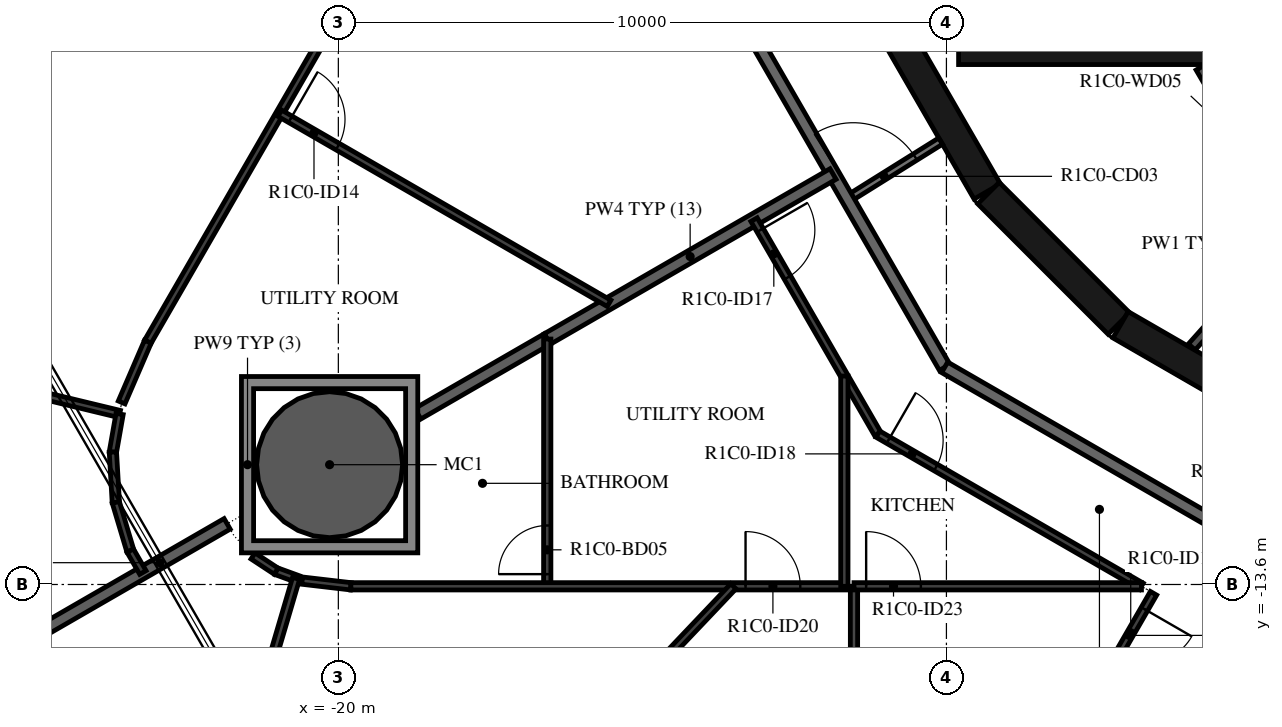
"""IFC4 building model, lengths in metres.
Left out: names, types, materials, properties, quantities, classifications, styles, units other than length and angle.
Written with IfcOpenShell. Run it as: python <this file> out.ifc"""

import sys

from ifc_helpers import new_model, si_unit, direction, frame, frame_2d, origin, origin_2d, place, context, subcontext, project, spatial, polyline, rectangle, hollow_circle, outline, extrude, element, fill, save


model = new_model("IFC4")
c1 = context("Model", 3, precision=1e-05, world=origin(), true_north=direction((0.0, 1.0)))
c2 = subcontext(c1, "Body", "Model", "MODEL_VIEW")
j1 = project(units=[si_unit("LENGTHUNIT", "METRE"), si_unit("PLANEANGLEUNIT", "RADIAN")], contexts=[c1])
p1 = place(None, origin())
s1 = spatial("IfcSite", under=j1, at=p1, CompositionType="ELEMENT")
p2 = place(p1, origin())
s2 = spatial("IfcBuilding", under=s1, at=p2, CompositionType="ELEMENT")
p3 = place(p2, frame((0.0, 0.0, 59.4)))
s3 = spatial("IfcBuildingStorey", under=s2, at=p3, CompositionType="ELEMENT", Elevation=59.4)
p4 = place(p3, frame((-20.144, -11.63, -0.38), z_axis=(0.0, 0.0, 1.0), x_axis=(1.0, 0.0, 0.0)))
e1 = element("IfcColumn", 1, at=p4, inside=s3, PredefinedType="COLUMN", context=c2, shape_type="SweptSolid", body=[
    extrude(hollow_circle(Radius=1.2, WallThickness=0.06, at=origin_2d()), origin(), (0.0, 0.0, 1.0), 3.5),
])
p5 = place(p3, frame((-10.845, -4.51, 0.0), z_axis=(0.0, 0.0, 1.0), x_axis=(0.500087131594, -0.865975092491, 0.0)))
e2 = element("IfcWall", 2, at=p5, inside=s3, PredefinedType="SHEAR", context=c2, shape_type="SweptSolid", body=[
    extrude(rectangle(XDim=3.033, YDim=0.5, at=frame_2d((1.516, 0.0))), origin(), (0.0, 0.0, 1.0), 3.12),
])
p6 = place(p3, frame((-9.308, -7.164, 0.0), z_axis=(0.0, 0.0, 1.0), x_axis=(0.707106781187, -0.707106781187, 0.0)))
e3 = element("IfcWall", 3, at=p6, inside=s3, PredefinedType="SHEAR", context=c2, shape_type="SweptSolid", body=[
    extrude(rectangle(XDim=3.032, YDim=0.5, at=frame_2d((1.516, 0.0))), origin(), (0.0, 0.0, 1.0), 3.12),
])
p7 = place(p3, frame((-7.137, -9.329, 0.0), z_axis=(0.0, 0.0, 1.0), x_axis=(0.865975092491, -0.500087131594, 0.0)))
e4 = element("IfcWall", 4, at=p7, inside=s3, PredefinedType="SHEAR", context=c2, shape_type="SweptSolid", body=[
    extrude(rectangle(XDim=3.033, YDim=0.5, at=frame_2d((1.516, 0.0))), origin(), (0.0, 0.0, 1.0), 3.12),
])
p8 = place(p3, origin())
e5 = element("IfcWall", 5, at=p8, inside=s3, PredefinedType="SHEAR", context=c2, shape_type="SweptSolid", body=[
    extrude(outline(polyline([(9.8, -5.05), (9.8, -4.8), (9.8, -1.9), (9.55, -1.9), (9.55, -4.8), (7.65, -4.8), (7.65, -1.9), (7.4, -1.9), (7.4, -4.8), (5.5, -4.8), (5.5, -1.9), (5.25, -1.9), (5.25, -4.8), (3.35, -4.8), (3.35, -1.9), (3.1, -1.9), (3.1, -4.8), (-5.25, -4.8), (-5.25, -1.9), (-5.5, -1.9), (-5.5, -4.8), (-7.4, -4.8), (-7.4, -1.9), (-7.65, -1.9), (-7.65, -4.8), (-9.55, -4.8), (-9.55, -1.9), (-9.8, -1.9), (-9.8, -4.8), (-9.8, -5.05), (9.8, -5.05)])), origin(), (0.0, 0.0, 1.0), 3.12),
])
p9 = place(p3, frame((-5.829, -5.102, 0.0), z_axis=(0.0, 0.0, 1.0), x_axis=(0.504480008384, -0.863423373057, 0.0)))
e6 = element("IfcWall", 6, at=p9, inside=s3, PredefinedType="PARTITIONING", context=c2, shape_type="SweptSolid", body=[
    extrude(rectangle(XDim=3.115, YDim=0.15, at=frame_2d((1.558, 0.0))), origin(), (0.0, 0.0, 1.0), 3.12),
])
p10 = place(p9, frame((1.107, 0.0, 0.0)))
e7 = element("IfcOpeningElement", 7, at=p10, cuts=e6, PredefinedType="OPENING", context=c2, shape_type="SweptSolid", body=[
    extrude(rectangle(XDim=0.9, YDim=2.1, at=frame_2d((0.45, 1.05))), frame((0.0, 0.085, 0.0), z_axis=(0.0, -1.0, 0.0), x_axis=(1.0, 0.0, 0.0)), (0.0, 0.0, 1.0), 0.17),
])
p11 = place(p3, frame((-4.311, -7.851, 0.0), z_axis=(0.0, 0.0, 1.0), x_axis=(-0.667869133096, -0.744278725383, 0.0)))
e8 = element("IfcWall", 8, at=p11, inside=s3, PredefinedType="PARTITIONING", context=c2, shape_type="SweptSolid", body=[
    extrude(rectangle(XDim=2.476, YDim=0.15, at=frame_2d((1.238, 0.0))), origin(), (0.0, 0.0, 1.0), 3.12),
])
p12 = place(p11, frame((0.788, 0.0, 0.0)))
e9 = element("IfcOpeningElement", 9, at=p12, cuts=e8, PredefinedType="OPENING", context=c2, shape_type="SweptSolid", body=[
    extrude(rectangle(XDim=0.9, YDim=2.1, at=frame_2d((0.45, 1.05))), frame((0.0, 0.085, 0.0), z_axis=(0.0, -1.0, 0.0), x_axis=(1.0, 0.0, 0.0)), (0.0, 0.0, 1.0), 0.17),
])
p13 = place(p3, frame((-11.625, -7.264, 0.0), z_axis=(0.0, 0.0, 1.0), x_axis=(0.84803632456, 0.529938102259, 0.0)))
e10 = element("IfcWall", 10, at=p13, inside=s3, PredefinedType="PARTITIONING", context=c2, shape_type="SweptSolid", body=[
    extrude(rectangle(XDim=1.804, YDim=0.12, at=frame_2d((0.902, 0.0))), origin(), (0.0, 0.0, 1.0), 3.12),
])
p14 = place(p13, frame((0.11, 0.0, 0.0)))
e11 = element("IfcOpeningElement", 11, at=p14, cuts=e10, PredefinedType="OPENING", context=c2, shape_type="SweptSolid", body=[
    extrude(rectangle(XDim=1.2, YDim=2.1, at=frame_2d((0.6, 1.05))), frame((0.0, 0.07, 0.0), z_axis=(0.0, -1.0, 0.0), x_axis=(1.0, 0.0, 0.0)), (0.0, 0.0, 1.0), 0.14),
])
p15 = place(p3, frame((-13.7, -3.671, 0.0), z_axis=(0.0, 0.0, 1.0), x_axis=(0.500001669485, -0.866024439905, 0.0)))
e12 = element("IfcWall", 12, at=p15, inside=s3, PredefinedType="STANDARD", context=c2, shape_type="SweptSolid", body=[
    extrude(rectangle(XDim=7.342, YDim=0.2, at=frame_2d((3.671, 0.0))), origin(), (0.0, 0.0, 1.0), 3.12),
])
p16 = place(p3, frame((-10.029, -10.029, 0.0), z_axis=(0.0, 0.0, 1.0), x_axis=(0.866022878987, -0.500004373052, 0.0)))
e13 = element("IfcWall", 13, at=p16, inside=s3, PredefinedType="STANDARD", context=c2, shape_type="SweptSolid", body=[
    extrude(rectangle(XDim=7.146, YDim=0.2, at=frame_2d((3.573, 0.0))), origin(), (0.0, 0.0, 1.0), 3.12),
])
p17 = place(p16, frame((5.947, 0.0, 0.0)))
e14 = element("IfcOpeningElement", 14, at=p17, cuts=e13, PredefinedType="OPENING", context=c2, shape_type="SweptSolid", body=[
    extrude(rectangle(XDim=1.0, YDim=2.1, at=frame_2d((0.5, 1.05))), frame((0.0, 0.11, 0.0), z_axis=(0.0, -1.0, 0.0), x_axis=(1.0, 0.0, 0.0)), (0.0, 0.0, 1.0), 0.22),
])
p18 = place(p3, frame((-16.565, -9.564, 0.0), z_axis=(0.0, 0.0, 1.0), x_axis=(0.866028274568, 0.499995027624, 0.0)))
e15 = element("IfcWall", 15, at=p18, inside=s3, PredefinedType="STANDARD", context=c2, shape_type="SweptSolid", body=[
    extrude(rectangle(XDim=5.427, YDim=0.2, at=frame_2d((2.714, 0.0))), origin(), (0.0, 0.0, 1.0), 3.12),
])
p19 = place(p3, frame((-27.025, -15.603, 0.0), z_axis=(0.0, 0.0, 1.0), x_axis=(0.866020924479, 0.500007758305, 0.0)))
e16 = element("IfcWall", 16, at=p19, inside=s3, PredefinedType="STANDARD", context=c2, shape_type="SweptSolid", body=[
    extrude(rectangle(XDim=6.0, YDim=0.2, at=frame_2d((3.0, 0.0))), origin(), (0.0, 0.0, 1.0), 3.12),
])
p20 = place(p3, frame((-18.694, -10.793, 0.0), z_axis=(0.0, 0.0, 1.0), x_axis=(0.866046662726, 0.499963176624, 0.0)))
e17 = element("IfcWall", 17, at=p20, inside=s3, PredefinedType="STANDARD", context=c2, shape_type="SweptSolid", body=[
    extrude(rectangle(XDim=2.458, YDim=0.2, at=frame_2d((1.229, 0.0))), origin(), (0.0, 0.0, 1.0), 3.12),
])
p21 = place(p3, frame((-17.13, 0.79, 0.0), z_axis=(0.0, 0.0, 1.0), x_axis=(-0.499997052475, -0.866027105532, 0.0)))
e18 = element("IfcWall", 18, at=p21, inside=s3, PredefinedType="PARTITIONING", context=c2, shape_type="SweptSolid", body=[
    extrude(rectangle(XDim=12.006, YDim=0.12, at=frame_2d((6.003, 0.0))), origin(), (0.0, 0.0, 1.0), 3.12),
])
p22 = place(p21, frame((1.498, 0.0, 0.0)))
e19 = element("IfcOpeningElement", 19, at=p22, cuts=e18, PredefinedType="OPENING", context=c2, shape_type="SweptSolid", body=[
    extrude(rectangle(XDim=0.9, YDim=2.1, at=frame_2d((0.45, 1.05))), frame((0.0, 0.07, 0.0), z_axis=(0.0, -1.0, 0.0), x_axis=(1.0, 0.0, 0.0)), (0.0, 0.0, 1.0), 0.14),
])
p23 = place(p3, frame((-20.963, -5.85, 0.0), z_axis=(0.0, 0.0, 1.0), x_axis=(0.866021746608, -0.500006334362, 0.0)))
e20 = element("IfcWall", 20, at=p23, inside=s3, PredefinedType="PARTITIONING", context=c2, shape_type="SweptSolid", body=[
    extrude(rectangle(XDim=6.253, YDim=0.12, at=frame_2d((3.127, 0.0))), origin(), (0.0, 0.0, 1.0), 3.12),
])
p24 = place(p23, frame((0.2, 0.0, 0.0)))
e21 = element("IfcOpeningElement", 21, at=p24, cuts=e20, PredefinedType="OPENING", context=c2, shape_type="SweptSolid", body=[
    extrude(rectangle(XDim=0.9, YDim=2.1, at=frame_2d((0.45, 1.05))), frame((0.0, 0.07, 0.0), z_axis=(0.0, -1.0, 0.0), x_axis=(1.0, 0.0, 0.0)), (0.0, 0.0, 1.0), 0.14),
])
p25 = place(p3, frame((-23.564, -10.606, 0.0), z_axis=(0.0, 0.0, 1.0), x_axis=(0.396195073027, 0.918166359713, 0.0)))
e22 = element("IfcWall", 22, at=p25, inside=s3, PredefinedType="PARTITIONING", context=c2, shape_type="SweptSolid", body=[
    extrude(rectangle(XDim=1.087, YDim=0.12, at=frame_2d((0.543, 0.0))), origin(), (0.0, 0.0, 1.0), 3.12),
])
p26 = place(p3, frame((-27.883, -9.762, 0.0), z_axis=(0.0, 0.0, 1.0), x_axis=(0.972097015458, -0.234579181809, 0.0)))
e23 = element("IfcWall", 23, at=p26, inside=s3, PredefinedType="PARTITIONING", context=c2, shape_type="SweptSolid", body=[
    extrude(rectangle(XDim=4.409, YDim=0.12, at=frame_2d((2.204, 0.0))), origin(), (0.0, 0.0, 1.0), 3.12),
])
p27 = place(p26, frame((0.2, 0.0, 0.0)))
e24 = element("IfcOpeningElement", 24, at=p27, cuts=e23, PredefinedType="OPENING", context=c2, shape_type="SweptSolid", body=[
    extrude(rectangle(XDim=0.9, YDim=2.1, at=frame_2d((0.45, 1.05))), frame((0.0, 0.07, 0.0), z_axis=(0.0, -1.0, 0.0), x_axis=(1.0, 0.0, 0.0)), (0.0, 0.0, 1.0), 0.14),
])
p28 = place(p3, frame((-23.597, -10.796, 0.0), z_axis=(0.0, 0.0, 1.0), x_axis=(-0.173610040386, -0.984814476882, 0.0)))
e25 = element("IfcWall", 25, at=p28, inside=s3, PredefinedType="PARTITIONING", context=c2, shape_type="SweptSolid", body=[
    extrude(rectangle(XDim=0.636, YDim=0.12, at=frame_2d((0.318, 0.0))), origin(), (0.0, 0.0, 1.0), 3.12),
])
p29 = place(p3, frame((-23.708, -11.422, 0.0), z_axis=(0.0, 0.0, 1.0), x_axis=(0.058031280246, -0.998314765248, 0.0)))
e26 = element("IfcWall", 26, at=p29, inside=s3, PredefinedType="PARTITIONING", context=c2, shape_type="SweptSolid", body=[
    extrude(rectangle(XDim=0.829, YDim=0.12, at=frame_2d((0.415, 0.0))), origin(), (0.0, 0.0, 1.0), 3.12),
])
p30 = place(p3, frame((-23.659, -12.25, 0.0), z_axis=(0.0, 0.0, 1.0), x_axis=(0.286834510868, -0.957980147694, 0.0)))
e27 = element("IfcWall", 27, at=p30, inside=s3, PredefinedType="PARTITIONING", context=c2, shape_type="SweptSolid", body=[
    extrude(rectangle(XDim=0.829, YDim=0.12, at=frame_2d((0.415, 0.0))), origin(), (0.0, 0.0, 1.0), 3.12),
])
p31 = place(p3, frame((-23.422, -13.044, 0.0), z_axis=(0.0, 0.0, 1.0), x_axis=(0.50013037474, -0.865950118807, 0.0)))
e28 = element("IfcWall", 28, at=p31, inside=s3, PredefinedType="PARTITIONING", context=c2, shape_type="SweptSolid", body=[
    extrude(rectangle(XDim=0.415, YDim=0.12, at=frame_2d((0.207, 0.0))), origin(), (0.0, 0.0, 1.0), 3.12),
])
p32 = place(p3, frame((-13.164, -7.6, 0.0), z_axis=(0.0, 0.0, 1.0), x_axis=(0.500000928893, -0.866024867487, 0.0)))
e29 = element("IfcWall", 29, at=p32, inside=s3, PredefinedType="PARTITIONING", context=c2, shape_type="SweptSolid", body=[
    extrude(rectangle(XDim=4.073, YDim=0.12, at=frame_2d((2.036, 0.0))), origin(), (0.0, 0.0, 1.0), 3.12),
])
p33 = place(p32, frame((0.2, 0.0, 0.0)))
e30 = element("IfcOpeningElement", 30, at=p33, cuts=e29, PredefinedType="OPENING", context=c2, shape_type="SweptSolid", body=[
    extrude(rectangle(XDim=0.9, YDim=2.1, at=frame_2d((0.45, 1.05))), frame((0.0, 0.07, 0.0), z_axis=(0.0, -1.0, 0.0), x_axis=(1.0, 0.0, 0.0)), (0.0, 0.0, 1.0), 0.14),
])
p34 = place(p3, frame((-11.127, -11.127, 0.0), z_axis=(0.0, 0.0, 1.0), x_axis=(0.866034514313, -0.499984219769, 0.0)))
e31 = element("IfcWall", 31, at=p34, inside=s3, PredefinedType="PARTITIONING", context=c2, shape_type="SweptSolid", body=[
    extrude(rectangle(XDim=5.006, YDim=0.12, at=frame_2d((2.503, 0.0))), origin(), (0.0, 0.0, 1.0), 3.12),
])
p35 = place(p34, frame((0.2, 0.0, 0.0)))
e32 = element("IfcOpeningElement", 32, at=p35, cuts=e31, PredefinedType="OPENING", context=c2, shape_type="SweptSolid", body=[
    extrude(rectangle(XDim=0.9, YDim=2.1, at=frame_2d((0.45, 1.05))), frame((0.0, 0.07, 0.0), z_axis=(0.0, -1.0, 0.0), x_axis=(1.0, 0.0, 0.0)), (0.0, 0.0, 1.0), 0.14),
])
p36 = place(p3, frame((-6.594, -13.744, 0.0), z_axis=(0.0, 0.0, 1.0), x_axis=(-0.499947031044, -0.866055983265, 0.0)))
e33 = element("IfcWall", 33, at=p36, inside=s3, PredefinedType="PARTITIONING", context=c2, shape_type="SweptSolid", body=[
    extrude(rectangle(XDim=1.6, YDim=0.12, at=frame_2d((0.8, 0.0))), origin(), (0.0, 0.0, 1.0), 3.12),
])
p37 = place(p36, frame((0.3, 0.0, 0.0)))
e34 = element("IfcOpeningElement", 34, at=p37, cuts=e33, PredefinedType="OPENING", context=c2, shape_type="SweptSolid", body=[
    extrude(rectangle(XDim=0.9, YDim=2.1, at=frame_2d((0.45, 1.05))), frame((0.0, 0.07, 0.0), z_axis=(0.0, -1.0, 0.0), x_axis=(1.0, 0.0, 0.0)), (0.0, 0.0, 1.0), 0.14),
])
p38 = place(p3, frame((-5.922, -15.98, 0.0), z_axis=(0.0, 0.0, 1.0), x_axis=(0.500013115284, 0.866017831539, 0.0)))
e35 = element("IfcWall", 35, at=p38, inside=s3, PredefinedType="PARTITIONING", context=c2, shape_type="SweptSolid", body=[
    extrude(rectangle(XDim=1.6, YDim=0.12, at=frame_2d((0.8, 0.0))), origin(), (0.0, 0.0, 1.0), 3.12),
])
p39 = place(p3, frame((-20.657, -13.514, 0.0), z_axis=(0.0, 0.0, 1.0), x_axis=(-0.939665068469, 0.34209583321, 0.0)))
e36 = element("IfcWall", 36, at=p39, inside=s3, PredefinedType="PARTITIONING", context=c2, shape_type="SweptSolid", body=[
    extrude(rectangle(XDim=0.389, YDim=0.12, at=frame_2d((0.194, 0.0))), origin(), (0.0, 0.0, 1.0), 3.12),
])
p40 = place(p3, frame((-21.023, -13.381, 0.0), z_axis=(0.0, 0.0, 1.0), x_axis=(-0.835339231854, 0.549734815821, 0.0)))
e37 = element("IfcWall", 37, at=p40, inside=s3, PredefinedType="PARTITIONING", context=c2, shape_type="SweptSolid", body=[
    extrude(rectangle(XDim=0.455, YDim=0.12, at=frame_2d((0.228, 0.0))), origin(), (0.0, 0.0, 1.0), 3.12),
])
p41 = place(p3, frame((-22.396, -19.266, 0.0), z_axis=(0.0, 0.0, 1.0), x_axis=(0.282896205585, 0.959150528783, 0.0)))
e38 = element("IfcWall", 38, at=p41, inside=s3, PredefinedType="PARTITIONING", context=c2, shape_type="SweptSolid", body=[
    extrude(rectangle(XDim=6.012, YDim=0.12, at=frame_2d((3.006, 0.0))), origin(), (0.0, 0.0, 1.0), 3.12),
])
p42 = place(p41, frame((0.2, 0.0, 0.0)))
e39 = element("IfcOpeningElement", 39, at=p42, cuts=e38, PredefinedType="OPENING", context=c2, shape_type="SweptSolid", body=[
    extrude(rectangle(XDim=0.9, YDim=2.1, at=frame_2d((0.45, 1.05))), frame((0.0, 0.07, 0.0), z_axis=(0.0, -1.0, 0.0), x_axis=(1.0, 0.0, 0.0)), (0.0, 0.0, 1.0), 0.14),
])
p43 = place(p3, frame((-16.565, -13.63, 0.0), z_axis=(0.0, 0.0, 1.0), x_axis=(0.0, 1.0, 0.0)))
e40 = element("IfcWall", 40, at=p43, inside=s3, PredefinedType="PARTITIONING", context=c2, shape_type="SweptSolid", body=[
    extrude(rectangle(XDim=4.066, YDim=0.12, at=frame_2d((2.033, 0.0))), origin(), (0.0, 0.0, 1.0), 3.12),
])
p44 = place(p43, frame((0.2, 0.0, 0.0)))
e41 = element("IfcOpeningElement", 41, at=p44, cuts=e40, PredefinedType="OPENING", context=c2, shape_type="SweptSolid", body=[
    extrude(rectangle(XDim=0.8, YDim=2.1, at=frame_2d((0.4, 1.05))), frame((0.0, 0.07, 0.0), z_axis=(0.0, -1.0, 0.0), x_axis=(1.0, 0.0, 0.0)), (0.0, 0.0, 1.0), 0.14),
])
p45 = place(p3, frame((-20.595, -13.536, 0.0), z_axis=(0.0, 0.0, 1.0), x_axis=(0.993259655268, -0.115910556968, 0.0)))
e42 = element("IfcWall", 42, at=p45, inside=s3, PredefinedType="PARTITIONING", context=c2, shape_type="SweptSolid", body=[
    extrude(rectangle(XDim=0.807, YDim=0.12, at=frame_2d((0.403, 0.0))), origin(), (0.0, 0.0, 1.0), 3.12),
])
p46 = place(p3, frame((-19.794, -13.63, 0.0), z_axis=(0.0, 0.0, 1.0), x_axis=(1.0, 0.0, 0.0)))
e43 = element("IfcWall", 43, at=p46, inside=s3, PredefinedType="PARTITIONING", context=c2, shape_type="SweptSolid", body=[
    extrude(rectangle(XDim=8.156, YDim=0.12, at=frame_2d((4.078, 0.0))), origin(), (0.0, 0.0, 1.0), 3.12),
])
p47 = place(p46, frame((6.491, 0.0, 0.0)))
e44 = element("IfcOpeningElement", 44, at=p47, cuts=e43, PredefinedType="OPENING", context=c2, shape_type="SweptSolid", body=[
    extrude(rectangle(XDim=0.9, YDim=2.1, at=frame_2d((0.45, 1.05))), frame((0.0, 0.07, 0.0), z_axis=(0.0, -1.0, 0.0), x_axis=(1.0, 0.0, 0.0)), (0.0, 0.0, 1.0), 0.14),
])
p48 = place(p3, frame((-11.678, -13.63, 0.0), z_axis=(0.0, 0.0, 1.0), x_axis=(0.0, 1.0, 0.0)))
e45 = element("IfcWall", 45, at=p48, inside=s3, PredefinedType="PARTITIONING", context=c2, shape_type="SweptSolid", body=[
    extrude(rectangle(XDim=3.458, YDim=0.12, at=frame_2d((1.729, 0.0))), origin(), (0.0, 0.0, 1.0), 3.12),
])
p49 = place(p3, frame((-19.2, -19.63, 0.0), z_axis=(0.0, 0.0, 1.0), x_axis=(0.688544699396, 0.72519390299, 0.0)))
e46 = element("IfcWall", 46, at=p49, inside=s3, PredefinedType="PARTITIONING", context=c2, shape_type="SweptSolid", body=[
    extrude(rectangle(XDim=8.274, YDim=0.12, at=frame_2d((4.137, 0.0))), origin(), (0.0, 0.0, 1.0), 3.12),
])
p50 = place(p49, frame((0.8, 0.0, 0.0)))
e47 = element("IfcOpeningElement", 47, at=p50, cuts=e46, PredefinedType="OPENING", context=c2, shape_type="SweptSolid", body=[
    extrude(rectangle(XDim=0.9, YDim=2.1, at=frame_2d((0.45, 1.05))), frame((0.0, 0.07, 0.0), z_axis=(0.0, -1.0, 0.0), x_axis=(1.0, 0.0, 0.0)), (0.0, 0.0, 1.0), 0.14),
])
p51 = place(p3, frame((-11.52, -19.63, 0.0), z_axis=(0.0, 0.0, 1.0), x_axis=(0.0, 1.0, 0.0)))
e48 = element("IfcWall", 48, at=p51, inside=s3, PredefinedType="PARTITIONING", context=c2, shape_type="SweptSolid", body=[
    extrude(rectangle(XDim=6.0, YDim=0.12, at=frame_2d((3.0, 0.0))), origin(), (0.0, 0.0, 1.0), 2.73),
])
p52 = place(p3, frame((-11.52, -13.63, 0.0), z_axis=(0.0, 0.0, 1.0), x_axis=(1.0, 0.0, 0.0)))
e49 = element("IfcWall", 49, at=p52, inside=s3, PredefinedType="PARTITIONING", context=c2, shape_type="SweptSolid", body=[
    extrude(rectangle(XDim=4.728, YDim=0.12, at=frame_2d((2.364, 0.0))), origin(), (0.0, 0.0, 1.0), 3.12),
])
p53 = place(p52, frame((0.2, 0.0, 0.0)))
e50 = element("IfcOpeningElement", 50, at=p53, cuts=e49, PredefinedType="OPENING", context=c2, shape_type="SweptSolid", body=[
    extrude(rectangle(XDim=0.9, YDim=2.1, at=frame_2d((0.45, 1.05))), frame((0.0, 0.07, 0.0), z_axis=(0.0, -1.0, 0.0), x_axis=(1.0, 0.0, 0.0)), (0.0, 0.0, 1.0), 0.14),
])
p54 = place(p3, origin())
e51 = element("IfcWall", 51, at=p54, inside=s3, PredefinedType="STANDARD", context=c2, shape_type="SweptSolid", body=[
    extrude(outline(polyline([(-18.694, -10.18), (-18.694, -13.08), (-21.594, -13.08), (-21.594, -10.18), (-18.694, -10.18)]), holes=[polyline([(-21.394, -12.88), (-18.894, -12.88), (-18.894, -10.38), (-21.394, -10.38), (-21.394, -12.88)])]), origin(), (0.0, 0.0, 1.0), 3.12),
])
p55 = place(p24, origin())
e52 = element("IfcDoor", 52, at=p55, inside=s3, OperationType="SINGLE_SWING_RIGHT", PredefinedType="DOOR", context=c2, shape_type="SweptSolid", body=[
    extrude(rectangle(XDim=0.9, YDim=2.1, at=frame_2d((0.45, 1.05))), frame((0.0, 0.025, 0.0), z_axis=(0.0, -1.0, 0.0), x_axis=(1.0, 0.0, 0.0)), (0.0, 0.0, 1.0), 0.05),
])
fill(e21, e52)
p56 = place(p33, origin())
e53 = element("IfcDoor", 53, at=p56, inside=s3, OperationType="SINGLE_SWING_LEFT", PredefinedType="DOOR", context=c2, shape_type="SweptSolid", body=[
    extrude(rectangle(XDim=0.9, YDim=2.1, at=frame_2d((0.45, 1.05))), frame((0.0, 0.025, 0.0), z_axis=(0.0, -1.0, 0.0), x_axis=(1.0, 0.0, 0.0)), (0.0, 0.0, 1.0), 0.05),
])
fill(e30, e53)
p57 = place(p35, origin())
e54 = element("IfcDoor", 54, at=p57, inside=s3, OperationType="SINGLE_SWING_LEFT", PredefinedType="DOOR", context=c2, shape_type="SweptSolid", body=[
    extrude(rectangle(XDim=0.9, YDim=2.1, at=frame_2d((0.45, 1.05))), frame((0.0, 0.025, 0.0), z_axis=(0.0, -1.0, 0.0), x_axis=(1.0, 0.0, 0.0)), (0.0, 0.0, 1.0), 0.05),
])
fill(e32, e54)
p58 = place(p37, origin())
e55 = element("IfcDoor", 55, at=p58, inside=s3, OperationType="SINGLE_SWING_RIGHT", PredefinedType="DOOR", context=c2, shape_type="SweptSolid", body=[
    extrude(rectangle(XDim=0.9, YDim=2.1, at=frame_2d((0.45, 1.05))), frame((0.0, 0.025, 0.0), z_axis=(0.0, -1.0, 0.0), x_axis=(1.0, 0.0, 0.0)), (0.0, 0.0, 1.0), 0.05),
])
fill(e34, e55)
p59 = place(p44, origin())
e56 = element("IfcDoor", 56, at=p59, inside=s3, OperationType="SINGLE_SWING_LEFT", PredefinedType="DOOR", context=c2, shape_type="SweptSolid", body=[
    extrude(rectangle(XDim=0.8, YDim=2.1, at=frame_2d((0.4, 1.05))), frame((0.0, 0.025, 0.0), z_axis=(0.0, -1.0, 0.0), x_axis=(1.0, 0.0, 0.0)), (0.0, 0.0, 1.0), 0.05),
])
fill(e41, e56)
p60 = place(p47, origin())
e57 = element("IfcDoor", 57, at=p60, inside=s3, OperationType="SINGLE_SWING_LEFT", PredefinedType="DOOR", context=c2, shape_type="SweptSolid", body=[
    extrude(rectangle(XDim=0.9, YDim=2.1, at=frame_2d((0.45, 1.05))), frame((0.0, 0.025, 0.0), z_axis=(0.0, -1.0, 0.0), x_axis=(1.0, 0.0, 0.0)), (0.0, 0.0, 1.0), 0.05),
])
fill(e44, e57)
p61 = place(p53, origin())
e58 = element("IfcDoor", 58, at=p61, inside=s3, OperationType="SINGLE_SWING_RIGHT", PredefinedType="DOOR", context=c2, shape_type="SweptSolid", body=[
    extrude(rectangle(XDim=0.9, YDim=2.1, at=frame_2d((0.45, 1.05))), frame((0.0, 0.025, 0.0), z_axis=(0.0, -1.0, 0.0), x_axis=(1.0, 0.0, 0.0)), (0.0, 0.0, 1.0), 0.05),
])
fill(e50, e58)
p62 = place(p14, origin())
e59 = element("IfcDoor", 59, at=p62, inside=s3, OperationType="DOUBLE_DOOR_SINGLE_SWING", PredefinedType="DOOR", context=c2, shape_type="SweptSolid", body=[
    extrude(rectangle(XDim=1.2, YDim=2.1, at=frame_2d((0.6, 1.05))), frame((0.0, 0.025, 0.0), z_axis=(0.0, -1.0, 0.0), x_axis=(1.0, 0.0, 0.0)), (0.0, 0.0, 1.0), 0.05),
])
fill(e11, e59)
save(model, sys.argv[1])
